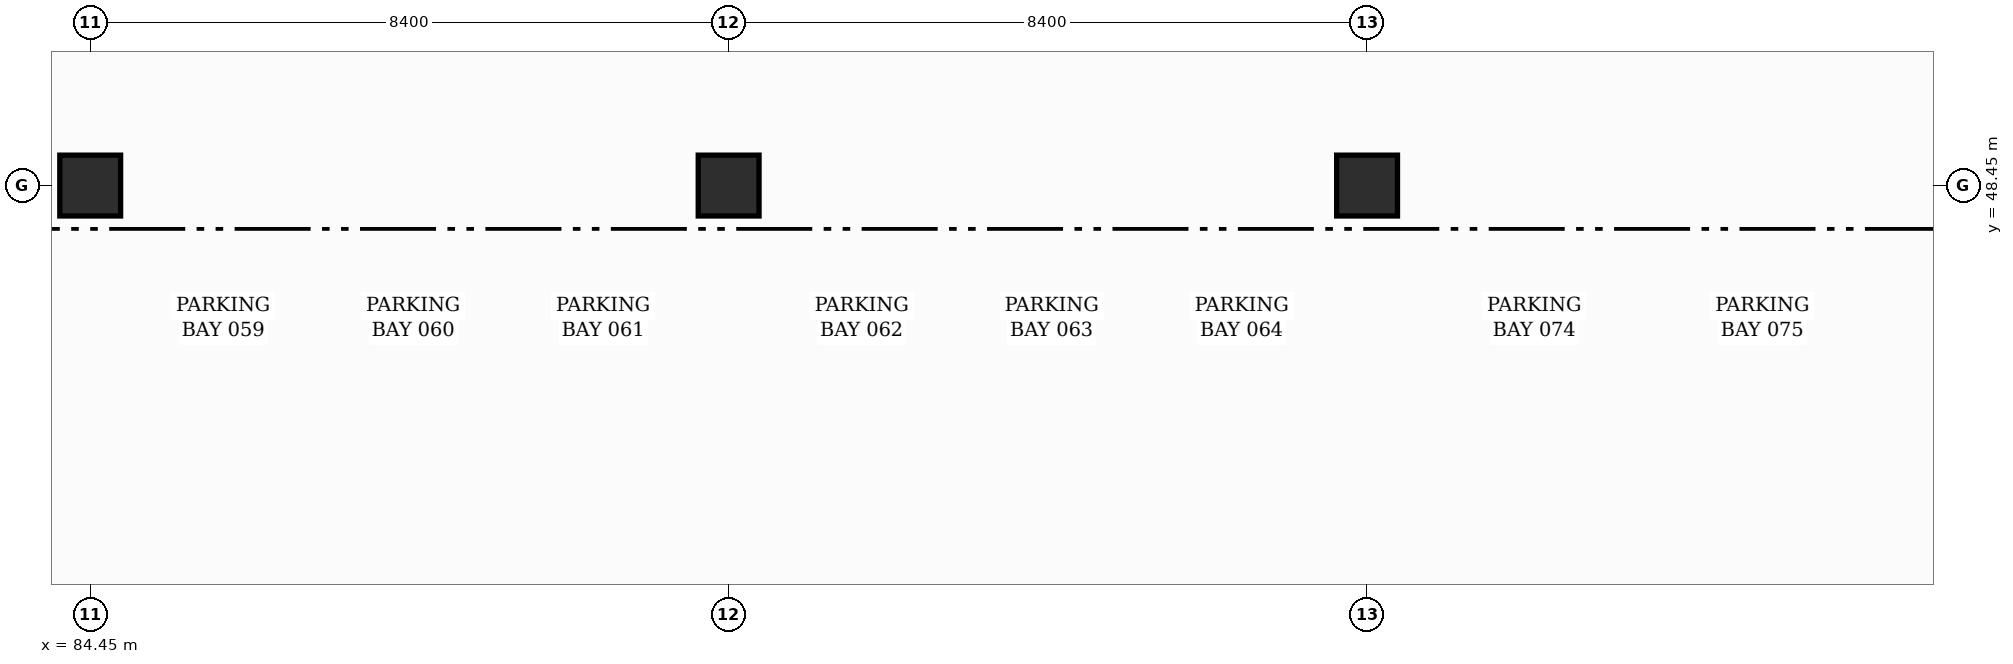
"""IFC4 building model, lengths in metres.
Left out: names, types, materials, properties, quantities, classifications, styles, units other than length and angle.
Written with IfcOpenShell. Run it as: python <this file> out.ifc"""

import sys

from ifc_helpers import new_model, si_unit, direction, frame, origin, origin_2d, place, context, subcontext, project, spatial, hollow_rectangle, extrude, element, save


model = new_model("IFC4")
c1 = context("Model", 3, precision=1e-05, world=origin(), true_north=direction((0.0, 1.0)))
c2 = subcontext(c1, "Body", "Model", "MODEL_VIEW")
j1 = project(units=[si_unit("LENGTHUNIT", "METRE"), si_unit("PLANEANGLEUNIT", "RADIAN")], contexts=[c1])
p1 = place(None, origin())
s1 = spatial("IfcSite", under=j1, at=p1, CompositionType="ELEMENT")
p2 = place(p1, origin())
s2 = spatial("IfcBuilding", under=s1, at=p2, CompositionType="ELEMENT")
p3 = place(p2, frame((0.0, 0.0, -5.4)))
s3 = spatial("IfcBuildingStorey", under=s2, at=p3, CompositionType="ELEMENT", Elevation=-5.4)
for number, where, z_axis, x_axis in (
    (1, (84.45, 48.45, 0.0), (0.0, 0.0, 1.0), (1.0, 0.0, 0.0)),
    (2, (92.85, 48.45, 0.0), (0.0, 0.0, 1.0), (1.0, 0.0, 0.0)),
    (3, (101.25, 48.45, 0.0), (0.0, 0.0, 1.0), (1.0, 0.0, 0.0)),
):
    element("IfcColumn", number, at=place(p3, frame(where, z_axis=z_axis, x_axis=x_axis)), inside=s3, PredefinedType="COLUMN", context=c2, shape_type="SweptSolid", body=[
        extrude(hollow_rectangle(XDim=0.8, YDim=0.8, WallThickness=0.032, InnerFilletRadius=0.032, OuterFilletRadius=0.064, at=origin_2d()), origin(), (0.0, 0.0, 1.0), 5.4),
    ])
save(model, sys.argv[1])
